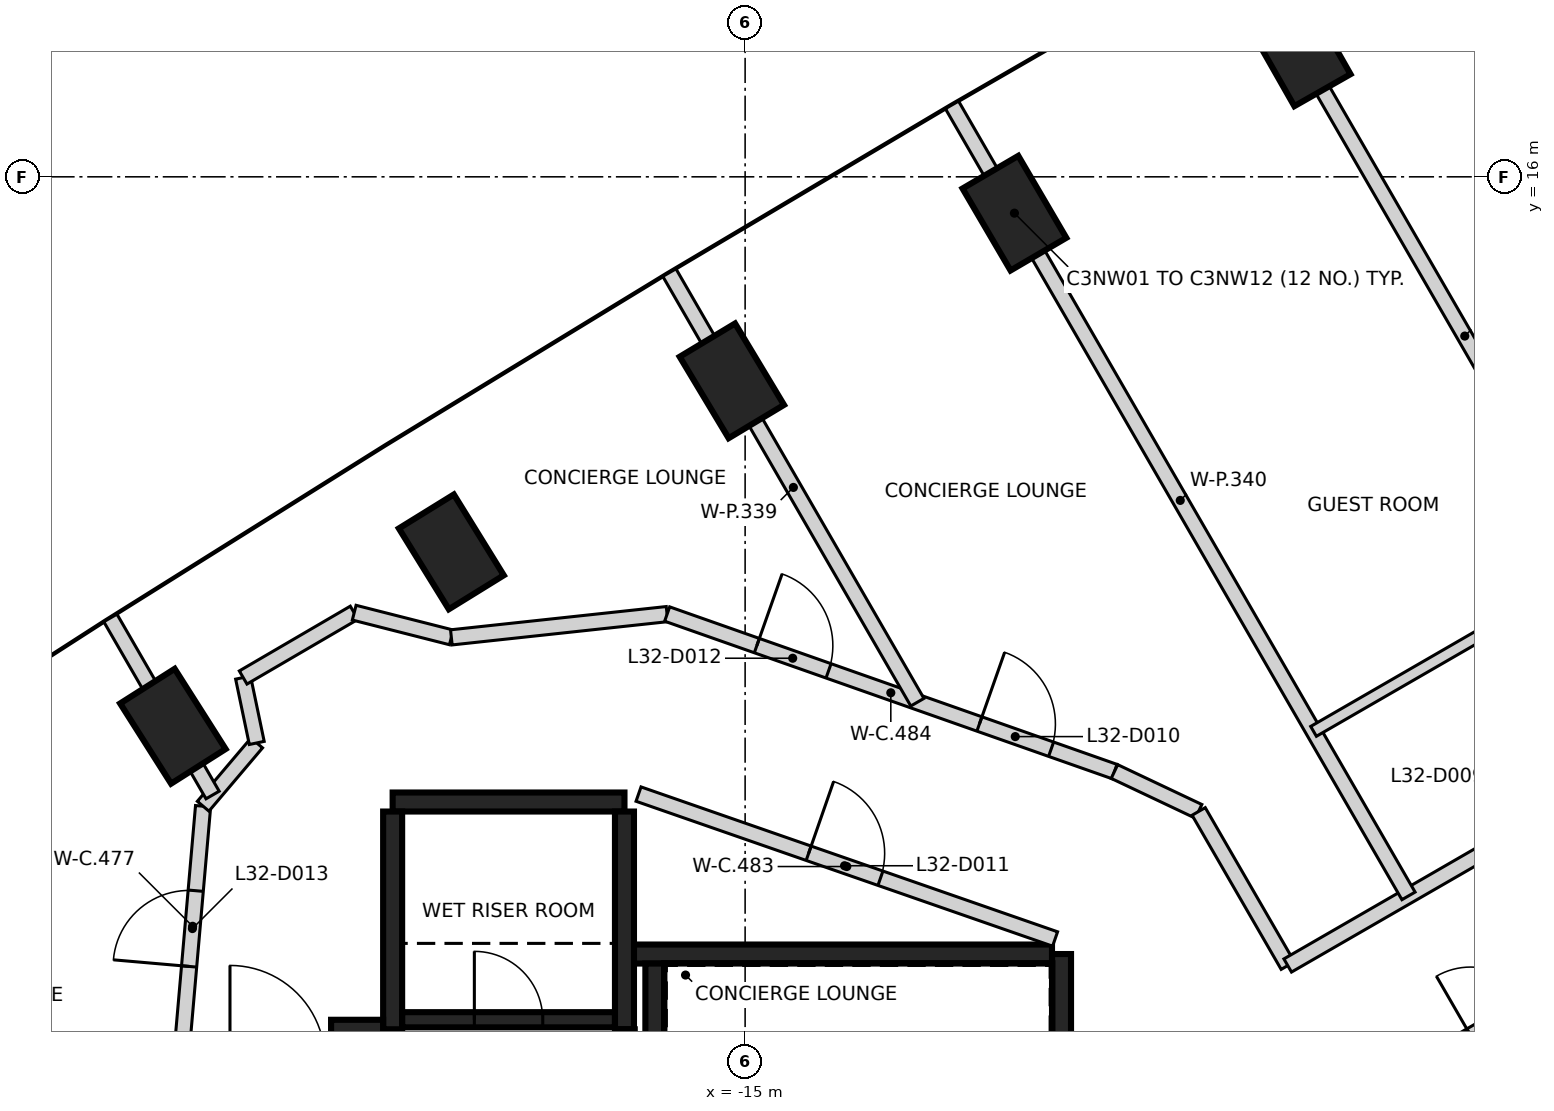
"""IFC4 building model, lengths in metres.
Left out: names, types, materials, properties, quantities, classifications, styles, units other than length and angle.
Written with IfcOpenShell. Run it as: python <this file> out.ifc"""

import sys

from ifc_helpers import new_model, si_unit, direction, frame, frame_2d, origin, origin_2d, place, context, subcontext, project, spatial, rectangle, extrude, element, fill, save


model = new_model("IFC4")
c1 = context("Model", 3, precision=1e-05, world=origin(), true_north=direction((0.0, 1.0)))
c2 = subcontext(c1, "Body", "Model", "MODEL_VIEW")
j1 = project(units=[si_unit("LENGTHUNIT", "METRE"), si_unit("PLANEANGLEUNIT", "RADIAN")], contexts=[c1])
p1 = place(None, origin())
s1 = spatial("IfcSite", under=j1, at=p1, CompositionType="ELEMENT")
p2 = place(p1, origin())
s2 = spatial("IfcBuilding", under=s1, at=p2, CompositionType="ELEMENT")
p3 = place(p2, frame((0.0, 0.0, 132.4)))
s3 = spatial("IfcBuildingStorey", under=s2, at=p3, CompositionType="ELEMENT", Elevation=132.4)
for number, where, z_axis, x_axis in (
    (1, (-7.714, 17.683, -0.4), (0.0, 0.0, 1.0), (-0.495, 0.869, 0.0)),
    (2, (-11.457, 15.522, -0.4), (0.0, 0.0, 1.0), (-0.505, 0.863, 0.0)),
    (3, (-15.175, 13.316, -0.4), (0.0, 0.0, 1.0), (-0.515, 0.857, 0.0)),
    (4, (-18.865, 11.066, -0.4), (0.0, 0.0, 1.0), (-0.526, 0.851, 0.0)),
    (5, (-22.529, 8.772, -0.4), (0.0, 0.0, 1.0), (-0.536, 0.844, 0.0)),
):
    element("IfcColumn", number, at=place(p3, frame(where, z_axis=z_axis, x_axis=x_axis)), inside=s3, PredefinedType="COLUMN", context=c2, shape_type="SweptSolid", body=[
        extrude(rectangle(XDim=1.25, YDim=0.85, at=origin_2d()), origin(), (0.0, 0.0, 1.0), 3.6),
    ])
p4 = place(p3, frame((-10.837, 5.775, 0.0), z_axis=(0.0, 0.0, 1.0), x_axis=(0.0, -1.0, 0.0)))
e6 = element("IfcWall", 6, at=p4, inside=s3, PredefinedType="SHEAR", context=c2, shape_type="SweptSolid", body=[
    extrude(rectangle(XDim=11.55, YDim=0.25, at=frame_2d((5.775, 0.0))), origin(), (0.0, 0.0, 1.0), 3.2),
])
p5 = place(p4, frame((10.025, 0.0, 0.0)))
e7 = element("IfcOpeningElement", 7, at=p5, cuts=e6, PredefinedType="OPENING", context=c2, shape_type="SweptSolid", body=[
    extrude(rectangle(XDim=1.2, YDim=2.1, at=frame_2d((0.6, 1.05))), frame((0.0, 0.135, 0.0), z_axis=(0.0, -1.0, 0.0), x_axis=(1.0, 0.0, 0.0)), (0.0, 0.0, 1.0), 0.27),
])
p6 = place(p4, frame((8.725, 0.0, 0.0)))
e8 = element("IfcOpeningElement", 8, at=p6, cuts=e6, PredefinedType="OPENING", context=c2, shape_type="SweptSolid", body=[
    extrude(rectangle(XDim=1.2, YDim=2.1, at=frame_2d((0.6, 1.05))), frame((0.0, 0.135, 0.0), z_axis=(0.0, -1.0, 0.0), x_axis=(1.0, 0.0, 0.0)), (0.0, 0.0, 1.0), 0.27),
])
p7 = place(p3, frame((-16.472, 5.775, 0.0), z_axis=(0.0, 0.0, 1.0), x_axis=(1.0, 0.0, 0.0)))
e9 = element("IfcWall", 9, at=p7, inside=s3, PredefinedType="SHEAR", context=c2, shape_type="SweptSolid", body=[
    extrude(rectangle(XDim=5.51, YDim=0.25, at=frame_2d((2.755, 0.0))), origin(), (0.0, 0.0, 1.0), 3.2),
])
p8 = place(p3, frame((-19.637, 7.775, 0.0), z_axis=(0.0, 0.0, 1.0), x_axis=(1.0, 0.0, 0.0)))
e10 = element("IfcWall", 10, at=p8, inside=s3, PredefinedType="SHEAR", context=c2, shape_type="SweptSolid", body=[
    extrude(rectangle(XDim=3.05, YDim=0.25, at=frame_2d((1.525, 0.0))), origin(), (0.0, 0.0, 1.0), 3.2),
])
for number, where, z_axis, x_axis in (
    (11, (-16.587, 7.65, 0.0), (0.0, 0.0, 1.0), (0.0, -1.0, 0.0)),
    (12, (-19.637, 4.785, 0.0), (0.0, 0.0, 1.0), (0.0, 1.0, 0.0)),
):
    element("IfcWall", number, at=place(p3, frame(where, z_axis=z_axis, x_axis=x_axis)), inside=s3, PredefinedType="SHEAR", context=c2, shape_type="SweptSolid", body=[
        extrude(rectangle(XDim=2.865, YDim=0.25, at=frame_2d((1.432, 0.0))), origin(), (0.0, 0.0, 1.0), 3.2),
    ])
p9 = place(p3, frame((-16.187, 3.2, 0.0), z_axis=(0.0, 0.0, 1.0), x_axis=(0.0, 1.0, 0.0)))
e13 = element("IfcWall", 13, at=p9, inside=s3, PredefinedType="SHEAR", context=c2, shape_type="SweptSolid", body=[
    extrude(rectangle(XDim=2.449, YDim=0.25, at=frame_2d((1.225, 0.0))), origin(), (0.0, 0.0, 1.0), 3.2),
])
p10 = place(p3, frame((-20.447, 4.785, 0.0), z_axis=(0.0, 0.0, 1.0), x_axis=(1.0, 0.0, 0.0)))
e14 = element("IfcWall", 14, at=p10, inside=s3, PredefinedType="SHEAR", context=c2, shape_type="SweptSolid", body=[
    extrude(rectangle(XDim=0.685, YDim=0.25, at=frame_2d((0.342, 0.0))), origin(), (0.0, 0.0, 1.0), 3.2),
])
p11 = place(p3, frame((-16.577, 4.785, 0.0), z_axis=(0.0, 0.0, 1.0), x_axis=(0.0, -1.0, 0.0)))
e15 = element("IfcWall", 15, at=p11, inside=s3, PredefinedType="SHEAR", context=c2, shape_type="SweptSolid", body=[
    extrude(rectangle(XDim=0.344, YDim=0.25, at=frame_2d((0.172, 0.0))), origin(), (0.0, 0.0, 1.0), 3.2),
])
p12 = place(p3, frame((-19.511, 4.91, 0.0), z_axis=(0.0, 0.0, 1.0), x_axis=(1.0, 0.0, 0.0)))
e16 = element("IfcWall", 16, at=p12, inside=s3, PredefinedType="SHEAR", context=c2, shape_type="SweptSolid", body=[
    extrude(rectangle(XDim=2.798, YDim=0.2, at=frame_2d((1.399, 0.0))), origin(), (0.0, 0.0, 1.0), 3.2),
])
p13 = place(p12, frame((0.949, 0.0, 0.0)))
e17 = element("IfcOpeningElement", 17, at=p13, cuts=e16, PredefinedType="OPENING", context=c2, shape_type="SweptSolid", body=[
    extrude(rectangle(XDim=0.9, YDim=2.1, at=frame_2d((0.45, 1.05))), frame((0.0, 0.11, 0.0), z_axis=(0.0, -1.0, 0.0), x_axis=(1.0, 0.0, 0.0)), (0.0, 0.0, 1.0), 0.22),
])
p14 = place(p3, frame((-22.407, 4.56, 0.0), z_axis=(0.0, 0.0, 1.0), x_axis=(0.086898645684, 0.996217157741, 0.0)))
e18 = element("IfcWall", 18, at=p14, inside=s3, PredefinedType="PARTITIONING", context=c2, shape_type="SweptSolid", body=[
    extrude(rectangle(XDim=3.172, YDim=0.2, at=frame_2d((1.586, 0.0))), origin(), (0.0, 0.0, 1.0), 3.2),
])
p15 = place(p14, frame((1.056, 0.0, 0.0)))
e19 = element("IfcOpeningElement", 19, at=p15, cuts=e18, PredefinedType="OPENING", context=c2, shape_type="SweptSolid", body=[
    extrude(rectangle(XDim=1.0, YDim=2.1, at=frame_2d((0.5, 1.05))), frame((0.0, 0.11, 0.0), z_axis=(0.0, -1.0, 0.0), x_axis=(1.0, 0.0, 0.0)), (0.0, 0.0, 1.0), 0.22),
])
p16 = place(p3, frame((-22.13, 7.719, 0.0), z_axis=(0.0, 0.0, 1.0), x_axis=(0.646413536249, 0.762987247701, 0.0)))
e20 = element("IfcWall", 20, at=p16, inside=s3, PredefinedType="PARTITIONING", context=c2, shape_type="SweptSolid", body=[
    extrude(rectangle(XDim=1.091, YDim=0.2, at=frame_2d((0.545, 0.0))), origin(), (0.0, 0.0, 1.0), 3.2),
])
p17 = place(p3, frame((-21.605, 9.412, 0.0), z_axis=(0.0, 0.0, 1.0), x_axis=(0.204764111512, -0.978811349871, 0.0)))
e21 = element("IfcWall", 21, at=p17, inside=s3, PredefinedType="PARTITIONING", context=c2, shape_type="SweptSolid", body=[
    extrude(rectangle(XDim=0.879, YDim=0.2, at=frame_2d((0.439, 0.0))), origin(), (0.0, 0.0, 1.0), 2.3),
])
p18 = place(p3, frame((-21.604, 9.413, 0.0), z_axis=(0.0, 0.0, 1.0), x_axis=(0.863736988548, 0.503942868402, 0.0)))
e22 = element("IfcWall", 22, at=p18, inside=s3, PredefinedType="PARTITIONING", context=c2, shape_type="SweptSolid", body=[
    extrude(rectangle(XDim=1.69, YDim=0.2, at=frame_2d((0.845, 0.0))), origin(), (0.0, 0.0, 1.0), 2.3),
])
p19 = place(p3, frame((-20.143, 10.266, 0.0), z_axis=(0.0, 0.0, 1.0), x_axis=(0.969121308325, -0.246584447505, 0.0)))
e23 = element("IfcWall", 23, at=p19, inside=s3, PredefinedType="PARTITIONING", context=c2, shape_type="SweptSolid", body=[
    extrude(rectangle(XDim=1.319, YDim=0.2, at=frame_2d((0.659, 0.0))), origin(), (0.0, 0.0, 1.0), 2.3),
])
p20 = place(p3, frame((-18.865, 9.941, 0.0), z_axis=(0.0, 0.0, 1.0), x_axis=(0.99423123086, 0.107257911519, 0.0)))
e24 = element("IfcWall", 24, at=p20, inside=s3, PredefinedType="PARTITIONING", context=c2, shape_type="SweptSolid", body=[
    extrude(rectangle(XDim=2.854, YDim=0.2, at=frame_2d((1.427, 0.0))), origin(), (0.0, 0.0, 1.0), 3.2),
])
p21 = place(p3, frame((-16.402, 7.879, 0.0), z_axis=(0.0, 0.0, 1.0), x_axis=(0.944492255471, -0.328533680702, 0.0)))
e25 = element("IfcWall", 25, at=p21, inside=s3, PredefinedType="PARTITIONING", context=c2, shape_type="SweptSolid", body=[
    extrude(rectangle(XDim=5.802, YDim=0.2, at=frame_2d((2.901, 0.0))), origin(), (0.0, 0.0, 1.0), 3.2),
])
p22 = place(p21, frame((2.37, 0.0, 0.0)))
e26 = element("IfcOpeningElement", 26, at=p22, cuts=e25, PredefinedType="OPENING", context=c2, shape_type="SweptSolid", body=[
    extrude(rectangle(XDim=1.0, YDim=2.1, at=frame_2d((0.5, 1.05))), frame((0.0, 0.11, 0.0), z_axis=(0.0, -1.0, 0.0), x_axis=(1.0, 0.0, 0.0)), (0.0, 0.0, 1.0), 0.22),
])
p23 = place(p3, frame((-16.026, 10.248, 0.0), z_axis=(0.0, 0.0, 1.0), x_axis=(0.943234993827, -0.332126100179, 0.0)))
e27 = element("IfcWall", 27, at=p23, inside=s3, PredefinedType="PARTITIONING", context=c2, shape_type="SweptSolid", body=[
    extrude(rectangle(XDim=6.239, YDim=0.2, at=frame_2d((3.119, 0.0))), origin(), (0.0, 0.0, 1.0), 3.2),
])
p24 = place(p23, frame((4.355, 0.0, 0.0)))
e28 = element("IfcOpeningElement", 28, at=p24, cuts=e27, PredefinedType="OPENING", context=c2, shape_type="SweptSolid", body=[
    extrude(rectangle(XDim=1.0, YDim=2.1, at=frame_2d((0.5, 1.05))), frame((0.0, 0.11, 0.0), z_axis=(0.0, -1.0, 0.0), x_axis=(1.0, 0.0, 0.0)), (0.0, 0.0, 1.0), 0.22),
])
p25 = place(p23, frame((1.251, 0.0, 0.0)))
e29 = element("IfcOpeningElement", 29, at=p25, cuts=e27, PredefinedType="OPENING", context=c2, shape_type="SweptSolid", body=[
    extrude(rectangle(XDim=1.0, YDim=2.1, at=frame_2d((0.5, 1.05))), frame((0.0, 0.11, 0.0), z_axis=(0.0, -1.0, 0.0), x_axis=(1.0, 0.0, 0.0)), (0.0, 0.0, 1.0), 0.22),
])
p26 = place(p3, frame((-10.141, 8.176, 0.0), z_axis=(0.0, 0.0, 1.0), x_axis=(0.903904169039, -0.427735026849, 0.0)))
e30 = element("IfcWall", 30, at=p26, inside=s3, PredefinedType="PARTITIONING", context=c2, shape_type="SweptSolid", body=[
    extrude(rectangle(XDim=1.225, YDim=0.2, at=frame_2d((0.612, 0.0))), origin(), (0.0, 0.0, 1.0), 3.2),
])
p27 = place(p3, frame((-9.033, 7.651, 0.0), z_axis=(0.0, 0.0, 1.0), x_axis=(0.500354010599, -0.865820919173, 0.0)))
e31 = element("IfcWall", 31, at=p27, inside=s3, PredefinedType="PARTITIONING", context=c2, shape_type="SweptSolid", body=[
    extrude(rectangle(XDim=2.342, YDim=0.2, at=frame_2d((1.171, 0.0))), origin(), (0.0, 0.0, 1.0), 3.2),
])
p28 = place(p3, frame((-8.613, 2.881, 0.0), z_axis=(0.0, 0.0, 1.0), x_axis=(0.866103179807, 0.499865263774, 0.0)))
e32 = element("IfcWall", 32, at=p28, inside=s3, PredefinedType="PARTITIONING", context=c2, shape_type="SweptSolid", body=[
    extrude(rectangle(XDim=12.036, YDim=0.2, at=frame_2d((6.018, 0.0))), origin(), (0.0, 0.0, 1.0), 3.2),
])
p29 = place(p28, frame((9.652, 0.0, 0.0)))
e33 = element("IfcOpeningElement", 33, at=p29, cuts=e32, PredefinedType="OPENING", context=c2, shape_type="SweptSolid", body=[
    extrude(rectangle(XDim=0.9, YDim=2.1, at=frame_2d((0.45, 1.05))), frame((0.0, 0.11, 0.0), z_axis=(0.0, -1.0, 0.0), x_axis=(1.0, 0.0, 0.0)), (0.0, 0.0, 1.0), 0.22),
])
p30 = place(p28, frame((3.646, 0.0, 0.0)))
e34 = element("IfcOpeningElement", 34, at=p30, cuts=e32, PredefinedType="OPENING", context=c2, shape_type="SweptSolid", body=[
    extrude(rectangle(XDim=0.9, YDim=2.1, at=frame_2d((0.45, 1.05))), frame((0.0, 0.11, 0.0), z_axis=(0.0, -1.0, 0.0), x_axis=(1.0, 0.0, 0.0)), (0.0, 0.0, 1.0), 0.22),
])
p31 = place(p3, frame((-7.862, 5.624, 0.0), z_axis=(0.0, 0.0, 1.0), x_axis=(0.866109024618, 0.499855136491, 0.0)))
e35 = element("IfcWall", 35, at=p31, inside=s3, PredefinedType="PARTITIONING", context=c2, shape_type="SweptSolid", body=[
    extrude(rectangle(XDim=9.61, YDim=0.2, at=frame_2d((4.805, 0.0))), origin(), (0.0, 0.0, 1.0), 3.2),
])
p32 = place(p31, frame((6.345, 0.0, 0.0)))
e36 = element("IfcOpeningElement", 36, at=p32, cuts=e35, PredefinedType="OPENING", context=c2, shape_type="SweptSolid", body=[
    extrude(rectangle(XDim=0.95, YDim=2.1, at=frame_2d((0.475, 1.05))), frame((0.0, 0.11, 0.0), z_axis=(0.0, -1.0, 0.0), x_axis=(1.0, 0.0, 0.0)), (0.0, 0.0, 1.0), 0.22),
])
p33 = place(p31, frame((5.02, 0.0, 0.0)))
e37 = element("IfcOpeningElement", 37, at=p33, cuts=e35, PredefinedType="OPENING", context=c2, shape_type="SweptSolid", body=[
    extrude(rectangle(XDim=0.95, YDim=2.1, at=frame_2d((0.475, 1.05))), frame((0.0, 0.11, 0.0), z_axis=(0.0, -1.0, 0.0), x_axis=(1.0, 0.0, 0.0)), (0.0, 0.0, 1.0), 0.22),
])
p34 = place(p3, frame((-23.351, 10.197, 0.0), z_axis=(0.0, 0.0, 1.0), x_axis=(0.49992673358, -0.86606770004, 0.0)))
e38 = element("IfcWall", 38, at=p34, inside=s3, PredefinedType="PARTITIONING", context=c2, shape_type="SweptSolid", body=[
    extrude(rectangle(XDim=2.69, YDim=0.2, at=frame_2d((1.345, 0.0))), origin(), (0.0, 0.0, 1.0), 3.2),
])
p35 = place(p3, frame((-15.996, 14.74, 0.0), z_axis=(0.0, 0.0, 1.0), x_axis=(0.499925398456, -0.866068470722, 0.0)))
e39 = element("IfcWall", 39, at=p35, inside=s3, PredefinedType="PARTITIONING", context=c2, shape_type="SweptSolid", body=[
    extrude(rectangle(XDim=6.526, YDim=0.2, at=frame_2d((3.263, 0.0))), origin(), (0.0, 0.0, 1.0), 3.2),
])
p36 = place(p3, frame((-12.279, 16.946, 0.0), z_axis=(0.0, 0.0, 1.0), x_axis=(0.499902454835, -0.866081714187, 0.0)))
e40 = element("IfcWall", 40, at=p36, inside=s3, PredefinedType="PARTITIONING", context=c2, shape_type="SweptSolid", body=[
    extrude(rectangle(XDim=12.015, YDim=0.2, at=frame_2d((6.008, 0.0))), origin(), (0.0, 0.0, 1.0), 3.2),
])
p37 = place(p3, frame((-8.535, 19.107, 0.0), z_axis=(0.0, 0.0, 1.0), x_axis=(0.499972843048, -0.86604108229, 0.0)))
e41 = element("IfcWall", 41, at=p37, inside=s3, PredefinedType="PARTITIONING", context=c2, shape_type="SweptSolid", body=[
    extrude(rectangle(XDim=12.013, YDim=0.2, at=frame_2d((6.007, 0.0))), origin(), (0.0, 0.0, 1.0), 3.2),
])
p38 = place(p3, frame((-8.0, 0.924, 0.0), z_axis=(0.0, 0.0, 1.0), x_axis=(0.86604129137, 0.499972480886, 0.0)))
e42 = element("IfcWall", 42, at=p38, inside=s3, PredefinedType="PARTITIONING", context=c2, shape_type="SweptSolid", body=[
    extrude(rectangle(XDim=12.932, YDim=0.2, at=frame_2d((6.466, 0.0))), origin(), (0.0, 0.0, 1.0), 2.3),
])
p39 = place(p3, frame((-7.522, 8.704, 0.0), z_axis=(0.0, 0.0, 1.0), x_axis=(0.865972067821, 0.500092369221, 0.0)))
e43 = element("IfcWall", 43, at=p39, inside=s3, PredefinedType="PARTITIONING", context=c2, shape_type="SweptSolid", body=[
    extrude(rectangle(XDim=2.723, YDim=0.15, at=frame_2d((1.362, 0.0))), origin(), (0.0, 0.0, 1.0), 3.2),
])
p40 = place(p13, origin())
e44 = element("IfcDoor", 44, at=p40, inside=s3, OperationType="SINGLE_SWING_LEFT", PredefinedType="DOOR", context=c2, shape_type="SweptSolid", body=[
    extrude(rectangle(XDim=0.9, YDim=2.1, at=frame_2d((0.45, 1.05))), frame((0.0, 0.025, 0.0), z_axis=(0.0, -1.0, 0.0), x_axis=(1.0, 0.0, 0.0)), (0.0, 0.0, 1.0), 0.05),
])
fill(e17, e44)
p41 = place(p24, origin())
e45 = element("IfcDoor", 45, at=p41, inside=s3, OperationType="SINGLE_SWING_LEFT", PredefinedType="DOOR", context=c2, shape_type="SweptSolid", body=[
    extrude(rectangle(XDim=1.0, YDim=2.1, at=frame_2d((0.5, 1.05))), frame((0.0, 0.025, 0.0), z_axis=(0.0, -1.0, 0.0), x_axis=(1.0, 0.0, 0.0)), (0.0, 0.0, 1.0), 0.05),
])
fill(e28, e45)
p42 = place(p22, frame((1.0, 0.0, 0.0), z_axis=(0.0, 0.0, 1.0), x_axis=(-1.0, 0.0, 0.0)))
e46 = element("IfcDoor", 46, at=p42, inside=s3, OperationType="SINGLE_SWING_LEFT", PredefinedType="DOOR", context=c2, shape_type="SweptSolid", body=[
    extrude(rectangle(XDim=1.0, YDim=2.1, at=frame_2d((0.5, 1.05))), frame((0.0, 0.025, 0.0), z_axis=(0.0, -1.0, 0.0), x_axis=(1.0, 0.0, 0.0)), (0.0, 0.0, 1.0), 0.05),
])
fill(e26, e46)
p43 = place(p25, origin())
e47 = element("IfcDoor", 47, at=p43, inside=s3, OperationType="SINGLE_SWING_LEFT", PredefinedType="DOOR", context=c2, shape_type="SweptSolid", body=[
    extrude(rectangle(XDim=1.0, YDim=2.1, at=frame_2d((0.5, 1.05))), frame((0.0, 0.025, 0.0), z_axis=(0.0, -1.0, 0.0), x_axis=(1.0, 0.0, 0.0)), (0.0, 0.0, 1.0), 0.05),
])
fill(e29, e47)
p44 = place(p15, origin())
e48 = element("IfcDoor", 48, at=p44, inside=s3, OperationType="SINGLE_SWING_LEFT", PredefinedType="DOOR", context=c2, shape_type="SweptSolid", body=[
    extrude(rectangle(XDim=1.0, YDim=2.1, at=frame_2d((0.5, 1.05))), frame((0.0, 0.025, 0.0), z_axis=(0.0, -1.0, 0.0), x_axis=(1.0, 0.0, 0.0)), (0.0, 0.0, 1.0), 0.05),
])
fill(e19, e48)
p45 = place(p30, frame((0.9, 0.0, 0.0), z_axis=(0.0, 0.0, 1.0), x_axis=(-1.0, 0.0, 0.0)))
e49 = element("IfcDoor", 49, at=p45, inside=s3, OperationType="SINGLE_SWING_LEFT", PredefinedType="DOOR", context=c2, shape_type="SweptSolid", body=[
    extrude(rectangle(XDim=0.9, YDim=2.1, at=frame_2d((0.45, 1.05))), frame((0.0, 0.025, 0.0), z_axis=(0.0, -1.0, 0.0), x_axis=(1.0, 0.0, 0.0)), (0.0, 0.0, 1.0), 0.05),
])
fill(e34, e49)
save(model, sys.argv[1])
